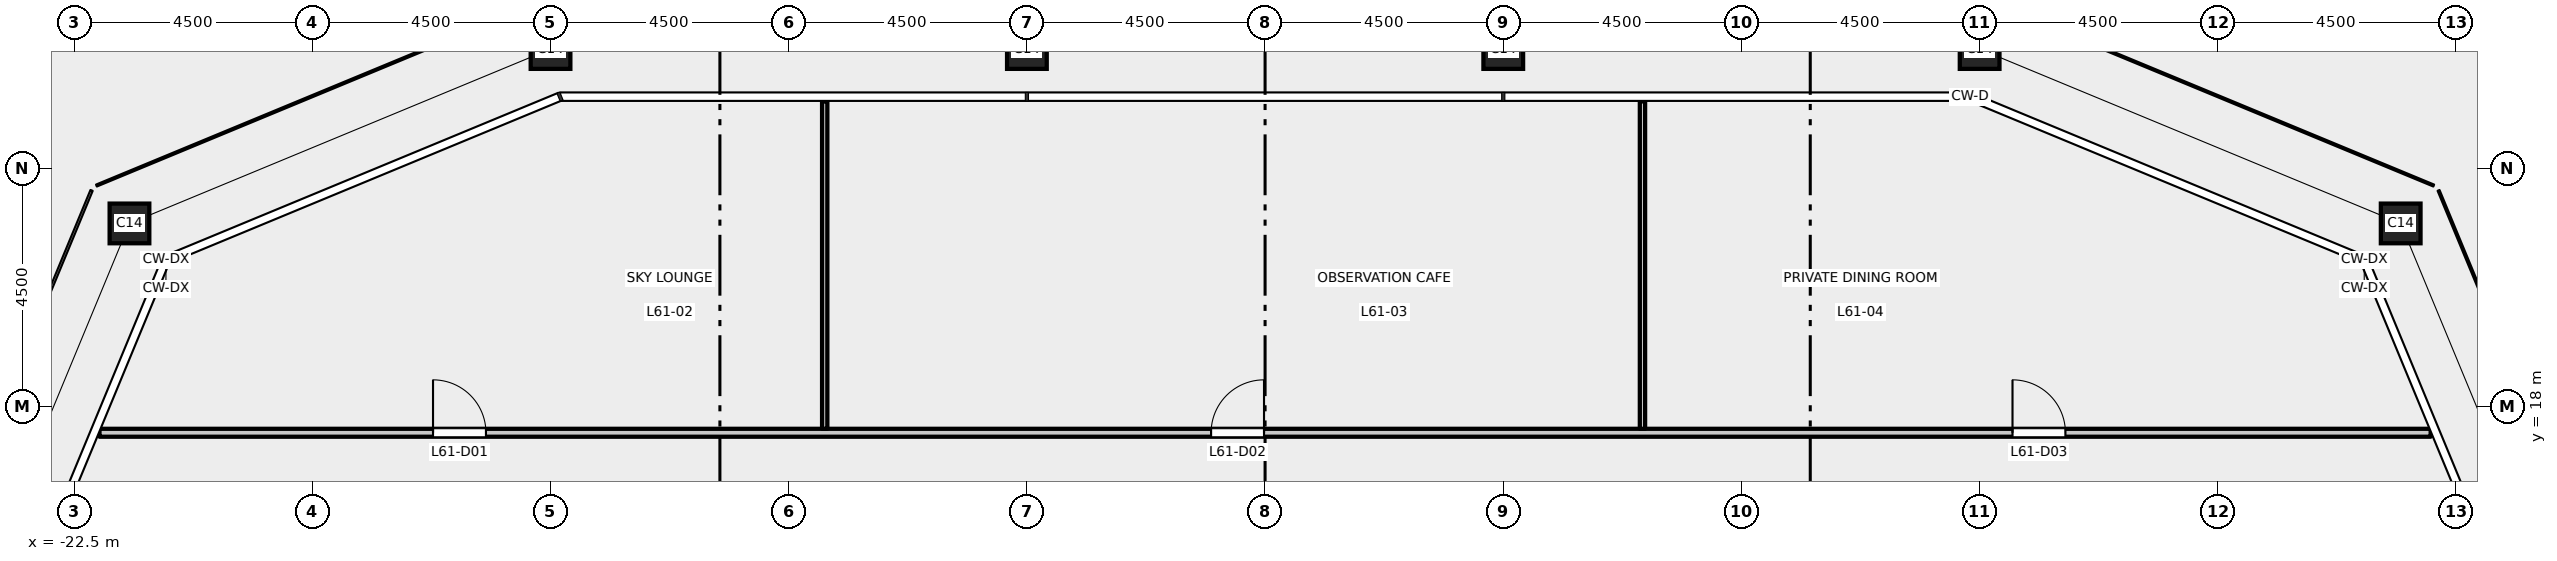
"""IFC4 building model, lengths in metres.
Left out: names, types, materials, properties, quantities, classifications, styles, units other than length and angle.
Written with IfcOpenShell. Run it as: python <this file> out.ifc"""

import sys

from ifc_helpers import new_model, si_unit, direction, frame, frame_2d, origin, origin_2d, place, context, subcontext, project, spatial, rectangle, hollow_rectangle, extrude, element, fill, save


model = new_model("IFC4")
c1 = context("Model", 3, precision=1e-05, world=origin(), true_north=direction((0.0, 1.0)))
c2 = subcontext(c1, "Body", "Model", "MODEL_VIEW")
j1 = project(units=[si_unit("LENGTHUNIT", "METRE"), si_unit("PLANEANGLEUNIT", "RADIAN")], contexts=[c1])
p1 = place(None, origin())
s1 = spatial("IfcSite", under=j1, at=p1, CompositionType="ELEMENT")
p2 = place(p1, origin())
s2 = spatial("IfcBuilding", under=s1, at=p2, CompositionType="ELEMENT")
p3 = place(p2, frame((0.0, 0.0, 284.2)))
s3 = spatial("IfcBuildingStorey", under=s2, at=p3, CompositionType="ELEMENT", Elevation=284.2)
for number, where, z_axis, x_axis in (
    (1, (21.455, 21.455, -0.2), (0.0, 0.0, 1.0), (1.0, 0.0, 0.0)),
    (2, (13.5, 24.75, -0.2), (0.0, 0.0, 1.0), (1.0, 0.0, 0.0)),
    (3, (4.5, 24.75, -0.2), (0.0, 0.0, 1.0), (1.0, 0.0, 0.0)),
    (4, (-4.5, 24.75, -0.2), (0.0, 0.0, 1.0), (1.0, 0.0, 0.0)),
    (5, (-13.5, 24.75, -0.2), (0.0, 0.0, 1.0), (1.0, 0.0, 0.0)),
    (6, (-21.455, 21.455, -0.2), (0.0, 0.0, 1.0), (1.0, 0.0, 0.0)),
):
    element("IfcColumn", number, at=place(p3, frame(where, z_axis=z_axis, x_axis=x_axis)), inside=s3, PredefinedType="COLUMN", context=c2, shape_type="SweptSolid", body=[
        extrude(hollow_rectangle(XDim=0.75, YDim=0.75, WallThickness=0.04, at=origin_2d()), origin(), (0.0, 0.0, 1.0), 5.7),
    ])
p4 = place(p3, frame((-22.021, 17.5, 0.0), z_axis=(0.0, 0.0, 1.0), x_axis=(1.0, 0.0, 0.0)))
e7 = element("IfcWall", 7, at=p4, inside=s3, PredefinedType="PARTITIONING", context=c2, shape_type="SweptSolid", body=[
    extrude(rectangle(XDim=44.042, YDim=0.15, at=frame_2d((22.021, 0.0))), origin(), (0.0, 0.0, 1.0), 5.35),
])
p5 = place(p4, frame((6.301, 0.0, 0.0)))
e8 = element("IfcOpeningElement", 8, at=p5, cuts=e7, PredefinedType="OPENING", context=c2, shape_type="SweptSolid", body=[
    extrude(rectangle(XDim=1.0, YDim=2.1, at=frame_2d((0.5, 1.05))), frame((0.0, 0.085, 0.0), z_axis=(0.0, -1.0, 0.0), x_axis=(1.0, 0.0, 0.0)), (0.0, 0.0, 1.0), 0.17),
])
p6 = place(p4, frame((21.001, 0.0, 0.0)))
e9 = element("IfcOpeningElement", 9, at=p6, cuts=e7, PredefinedType="OPENING", context=c2, shape_type="SweptSolid", body=[
    extrude(rectangle(XDim=1.0, YDim=2.1, at=frame_2d((0.5, 1.05))), frame((0.0, 0.085, 0.0), z_axis=(0.0, -1.0, 0.0), x_axis=(1.0, 0.0, 0.0)), (0.0, 0.0, 1.0), 0.17),
])
p7 = place(p4, frame((36.142, 0.0, 0.0)))
e10 = element("IfcOpeningElement", 10, at=p7, cuts=e7, PredefinedType="OPENING", context=c2, shape_type="SweptSolid", body=[
    extrude(rectangle(XDim=1.0, YDim=2.1, at=frame_2d((0.5, 1.05))), frame((0.0, 0.085, 0.0), z_axis=(0.0, -1.0, 0.0), x_axis=(1.0, 0.0, 0.0)), (0.0, 0.0, 1.0), 0.17),
])
for number, where, z_axis, x_axis in (
    (11, (-8.32, 17.575, 0.0), (0.0, 0.0, 1.0), (0.0, 1.0, 0.0)),
    (12, (7.13, 17.575, 0.0), (0.0, 0.0, 1.0), (0.0, 1.0, 0.0)),
):
    element("IfcWall", number, at=place(p3, frame(where, z_axis=z_axis, x_axis=x_axis)), inside=s3, PredefinedType="PARTITIONING", context=c2, shape_type="SweptSolid", body=[
        extrude(rectangle(XDim=6.185, YDim=0.1, at=frame_2d((3.093, 0.0))), origin(), (0.0, 0.0, 1.0), 5.35),
    ])
p8 = place(p5, origin())
e13 = element("IfcDoor", 13, at=p8, inside=s3, OperationType="SINGLE_SWING_LEFT", PredefinedType="DOOR", context=c2, shape_type="SweptSolid", body=[
    extrude(rectangle(XDim=1.0, YDim=2.1, at=frame_2d((0.5, 1.05))), frame((0.0, 0.025, 0.0), z_axis=(0.0, -1.0, 0.0), x_axis=(1.0, 0.0, 0.0)), (0.0, 0.0, 1.0), 0.05),
])
fill(e8, e13)
p9 = place(p6, origin())
e14 = element("IfcDoor", 14, at=p9, inside=s3, OperationType="SINGLE_SWING_RIGHT", PredefinedType="DOOR", context=c2, shape_type="SweptSolid", body=[
    extrude(rectangle(XDim=1.0, YDim=2.1, at=frame_2d((0.5, 1.05))), frame((0.0, 0.025, 0.0), z_axis=(0.0, -1.0, 0.0), x_axis=(1.0, 0.0, 0.0)), (0.0, 0.0, 1.0), 0.05),
])
fill(e9, e14)
p10 = place(p7, origin())
e15 = element("IfcDoor", 15, at=p10, inside=s3, OperationType="SINGLE_SWING_LEFT", PredefinedType="DOOR", context=c2, shape_type="SweptSolid", body=[
    extrude(rectangle(XDim=1.0, YDim=2.1, at=frame_2d((0.5, 1.05))), frame((0.0, 0.025, 0.0), z_axis=(0.0, -1.0, 0.0), x_axis=(1.0, 0.0, 0.0)), (0.0, 0.0, 1.0), 0.05),
])
fill(e10, e15)
save(model, sys.argv[1])
